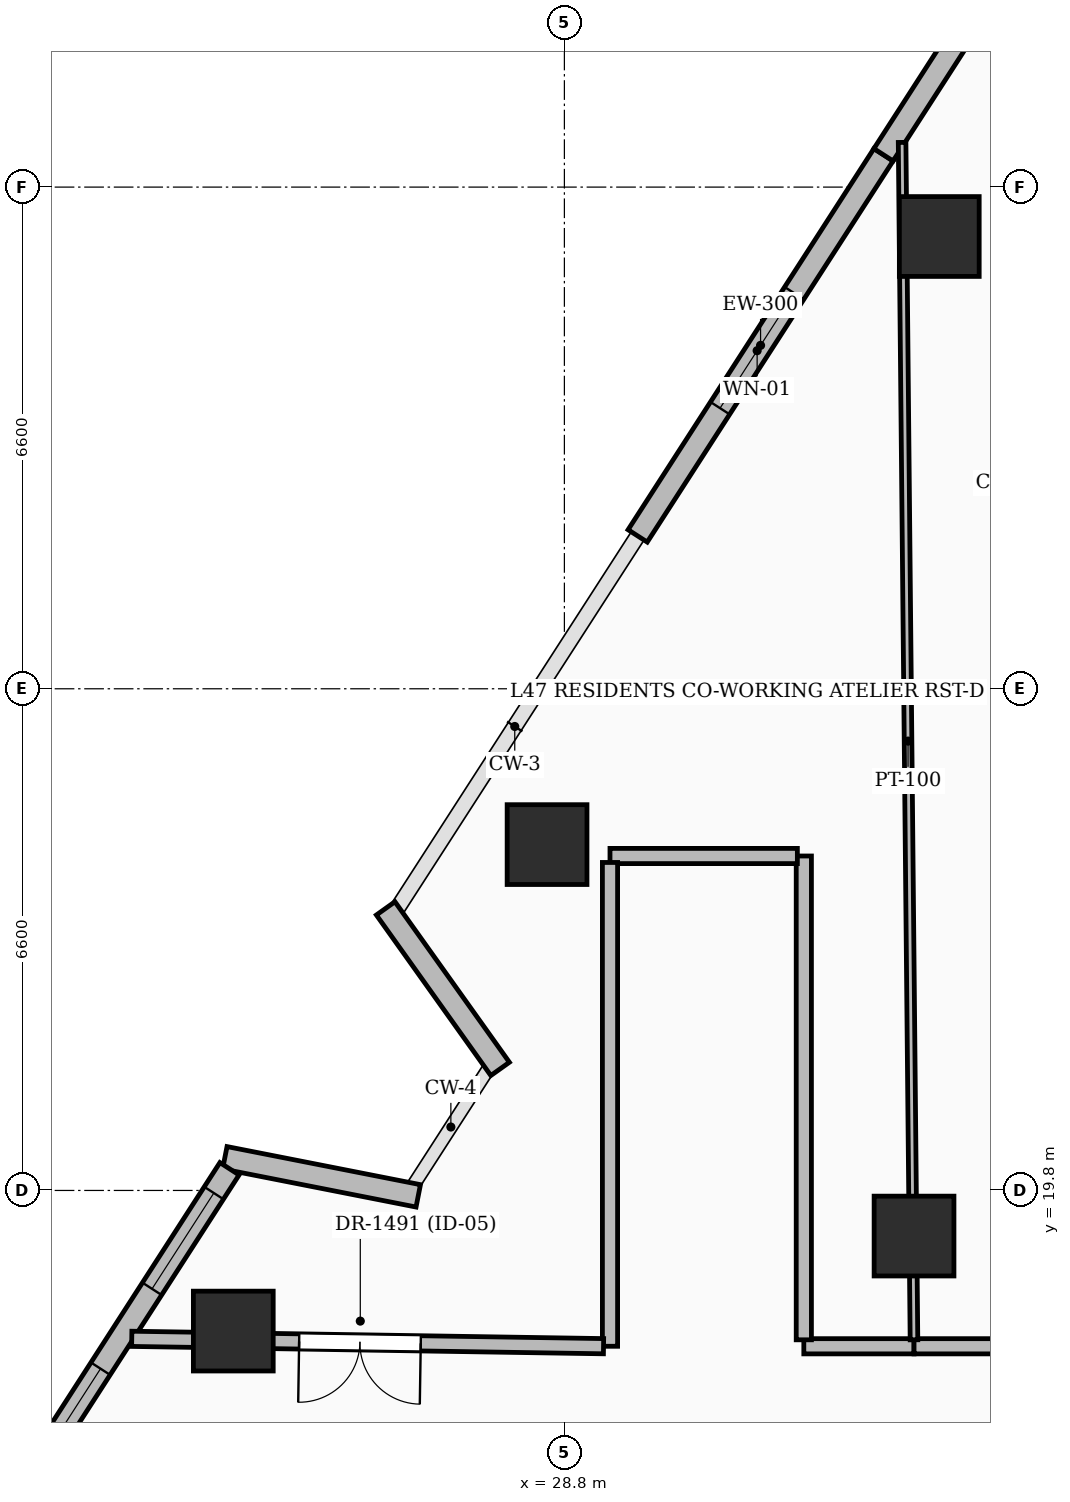
"""IFC4 building model, lengths in metres.
Left out: names, types, materials, properties, quantities, classifications, styles, units other than length and angle.
Written with IfcOpenShell. Run it as: python <this file> out.ifc"""

import sys

from ifc_helpers import new_model, si_unit, direction, frame, frame_2d, origin, origin_2d, place, context, subcontext, project, spatial, rectangle, extrude, element, fill, save


model = new_model("IFC4")
c1 = context("Model", 3, precision=1e-05, world=origin(), true_north=direction((0.0, 1.0)))
c2 = subcontext(c1, "Body", "Model", "MODEL_VIEW")
j1 = project(units=[si_unit("LENGTHUNIT", "METRE"), si_unit("PLANEANGLEUNIT", "RADIAN")], contexts=[c1])
p1 = place(None, origin())
s1 = spatial("IfcSite", under=j1, at=p1, CompositionType="ELEMENT")
p2 = place(p1, origin())
s2 = spatial("IfcBuilding", under=s1, at=p2, CompositionType="ELEMENT")
p3 = place(p2, frame((0.0, 0.0, 182.4)))
s3 = spatial("IfcBuildingStorey", under=s2, at=p3, CompositionType="ELEMENT", Elevation=182.4)
for number, where, z_axis, x_axis in (
    (1, (33.4, 19.2, 0.0), (0.0, 0.0, 1.0), (1.0, 0.0, 0.0)),
    (2, (33.732, 32.35, 0.0), (0.0, 0.0, 1.0), (1.0, 0.0, 0.0)),
    (3, (28.572, 24.35, 0.0), (0.0, 0.0, 1.0), (1.0, 0.0, 0.0)),
    (4, (24.444, 17.95, 0.0), (0.0, 0.0, 1.0), (1.0, 0.0, 0.0)),
):
    element("IfcColumn", number, at=place(p3, frame(where, z_axis=z_axis, x_axis=x_axis)), inside=s3, PredefinedType="COLUMN", context=c2, shape_type="SweptSolid", body=[
        extrude(rectangle(XDim=1.05, YDim=1.05, at=origin_2d()), origin(), (0.0, 0.0, 1.0), 3.6),
    ])
for number, where, z_axis, x_axis in (
    (5, (24.333, 20.23, 0.0), (0.0, 0.0, 1.0), (0.981, -0.193, 0.0)),
    (6, (27.954, 21.399, 0.0), (0.0, 0.0, 1.0), (-0.58, 0.814, 0.0)),
):
    element("IfcWall", number, at=place(p3, frame(where, z_axis=z_axis, x_axis=x_axis)), inside=s3, PredefinedType="SOLIDWALL", context=c2, shape_type="SweptSolid", body=[
        extrude(rectangle(XDim=2.594, YDim=0.3, at=frame_2d((1.297, 0.0))), origin(), (0.0, 0.0, 1.0), 2.575),
    ])
p4 = place(p3, frame((29.764, 28.411, 0.0), z_axis=(0.0, 0.0, 1.0), x_axis=(0.542030871579, 0.840358574809, 0.0)))
e7 = element("IfcWall", 7, at=p4, inside=s3, PredefinedType="SOLIDWALL", context=c2, shape_type="SweptSolid", body=[
    extrude(rectangle(XDim=5.967, YDim=0.3, at=frame_2d((2.983, 0.0))), origin(), (0.0, 0.0, 1.0), 3.35),
])
p5 = place(p4, frame((2.0, 0.0, 0.6)))
e8 = element("IfcOpeningElement", 8, at=p5, cuts=e7, PredefinedType="OPENING", context=c2, shape_type="SweptSolid", body=[
    extrude(rectangle(XDim=1.8, YDim=2.1, at=frame_2d((0.9, 1.05))), frame((0.0, 0.16, 0.0), z_axis=(0.0, -1.0, 0.0), x_axis=(1.0, 0.0, 0.0)), (0.0, 0.0, 1.0), 0.32),
])
p6 = place(p3, frame((32.998, 33.425, 0.0), z_axis=(0.0, 0.0, 1.0), x_axis=(0.542020612911, 0.840365191556, 0.0)))
e9 = element("IfcWall", 9, at=p6, inside=s3, PredefinedType="SOLIDWALL", context=c2, shape_type="SweptSolid", body=[
    extrude(rectangle(XDim=5.966, YDim=0.3, at=frame_2d((2.983, 0.0))), origin(), (0.0, 0.0, 1.0), 3.35),
])
p7 = place(p6, frame((1.725, 0.0, 0.55)))
e10 = element("IfcOpeningElement", 10, at=p7, cuts=e9, PredefinedType="OPENING", context=c2, shape_type="SweptSolid", body=[
    extrude(rectangle(XDim=1.6, YDim=2.2, at=frame_2d((0.8, 1.1))), frame((0.0, 0.16, 0.0), z_axis=(0.0, -1.0, 0.0), x_axis=(1.0, 0.0, 0.0)), (0.0, 0.0, 1.0), 0.32),
])
p8 = place(p3, frame((21.261, 15.228, 0.0), z_axis=(0.0, 0.0, 1.0), x_axis=(0.542022957278, 0.840363679477, 0.0)))
e11 = element("IfcWall", 11, at=p8, inside=s3, PredefinedType="SOLIDWALL", context=c2, shape_type="SweptSolid", body=[
    extrude(rectangle(XDim=5.78, YDim=0.3, at=frame_2d((2.89, 0.0))), origin(), (0.0, 0.0, 1.0), 3.35),
])
p9 = place(p8, frame((1.15, 0.0, 0.6)))
e12 = element("IfcOpeningElement", 12, at=p9, cuts=e11, PredefinedType="OPENING", context=c2, shape_type="SweptSolid", body=[
    extrude(rectangle(XDim=1.5, YDim=2.1, at=frame_2d((0.75, 1.05))), frame((0.0, 0.16, 0.0), z_axis=(0.0, -1.0, 0.0), x_axis=(1.0, 0.0, 0.0)), (0.0, 0.0, 1.0), 0.32),
])
p10 = place(p8, frame((3.9, 0.0, 0.6)))
e13 = element("IfcOpeningElement", 13, at=p10, cuts=e11, PredefinedType="OPENING", context=c2, shape_type="SweptSolid", body=[
    extrude(rectangle(XDim=1.5, YDim=2.1, at=frame_2d((0.75, 1.05))), frame((0.0, 0.16, 0.0), z_axis=(0.0, -1.0, 0.0), x_axis=(1.0, 0.0, 0.0)), (0.0, 0.0, 1.0), 0.32),
])
p11 = place(p3, frame((33.4, 17.75, 0.0), z_axis=(0.0, 0.0, 1.0), x_axis=(-1.0, 0.0, 0.0)))
e14 = element("IfcWall", 14, at=p11, inside=s3, PredefinedType="PARTITIONING", context=c2, shape_type="SweptSolid", body=[
    extrude(rectangle(XDim=1.45, YDim=0.2, at=frame_2d((0.725, 0.0))), origin(), (0.0, 0.0, 1.0), 3.35),
])
p12 = place(p3, frame((31.95, 17.835, 0.0), z_axis=(0.0, 0.0, 1.0), x_axis=(0.0, 1.0, 0.0)))
e15 = element("IfcWall", 15, at=p12, inside=s3, PredefinedType="PARTITIONING", context=c2, shape_type="SweptSolid", body=[
    extrude(rectangle(XDim=6.365, YDim=0.2, at=frame_2d((3.183, 0.0))), origin(), (0.0, 0.0, 1.0), 2.464),
])
p13 = place(p3, frame((31.865, 24.2, 0.0), z_axis=(0.0, 0.0, 1.0), x_axis=(-1.0, 0.0, 0.0)))
e16 = element("IfcWall", 16, at=p13, inside=s3, PredefinedType="PARTITIONING", context=c2, shape_type="SweptSolid", body=[
    extrude(rectangle(XDim=2.465, YDim=0.2, at=frame_2d((1.232, 0.0))), origin(), (0.0, 0.0, 1.0), 3.01),
])
p14 = place(p3, frame((29.4, 24.115, 0.0), z_axis=(0.0, 0.0, 1.0), x_axis=(0.0, -1.0, 0.0)))
e17 = element("IfcWall", 17, at=p14, inside=s3, PredefinedType="PARTITIONING", context=c2, shape_type="SweptSolid", body=[
    extrude(rectangle(XDim=6.365, YDim=0.2, at=frame_2d((3.183, 0.0))), origin(), (0.0, 0.0, 1.0), 2.464),
])
p15 = place(p3, frame((29.315, 17.751, 0.0), z_axis=(0.0, 0.0, 1.0), x_axis=(-0.999878105574, 0.01561326337, 0.0)))
e18 = element("IfcWall", 18, at=p15, inside=s3, PredefinedType="PARTITIONING", context=c2, shape_type="SweptSolid", body=[
    extrude(rectangle(XDim=6.208, YDim=0.2, at=frame_2d((3.104, 0.0))), origin(), (0.0, 0.0, 1.0), 3.01),
])
p16 = place(p15, frame((2.405, 0.0, 0.0)))
e19 = element("IfcOpeningElement", 19, at=p16, cuts=e18, PredefinedType="OPENING", context=c2, shape_type="SweptSolid", body=[
    extrude(rectangle(XDim=1.6, YDim=2.3, at=frame_2d((0.8, 1.15))), frame((0.0, 0.11, 0.0), z_axis=(0.0, -1.0, 0.0), x_axis=(1.0, 0.0, 0.0)), (0.0, 0.0, 1.0), 0.22),
])
p17 = place(p3, frame((38.13, 17.75, 0.0), z_axis=(0.0, 0.0, 1.0), x_axis=(-1.0, 0.0, 0.0)))
e20 = element("IfcWall", 20, at=p17, inside=s3, PredefinedType="PARTITIONING", context=c2, shape_type="SweptSolid", body=[
    extrude(rectangle(XDim=4.73, YDim=0.2, at=frame_2d((2.365, 0.0))), origin(), (0.0, 0.0, 1.0), 2.436),
])
p18 = place(p17, frame((1.565, 0.0, 0.0)))
e21 = element("IfcOpeningElement", 21, at=p18, cuts=e20, PredefinedType="OPENING", context=c2, shape_type="SweptSolid", body=[
    extrude(rectangle(XDim=1.6, YDim=2.3, at=frame_2d((0.8, 1.15))), frame((0.0, 0.11, 0.0), z_axis=(0.0, -1.0, 0.0), x_axis=(1.0, 0.0, 0.0)), (0.0, 0.0, 1.0), 0.22),
])
p19 = place(p3, frame((33.399, 17.835, 0.0), z_axis=(0.0, 0.0, 1.0), x_axis=(-0.009933797845, 0.999950658613, 0.0)))
e22 = element("IfcWall", 22, at=p19, inside=s3, PredefinedType="PARTITIONING", context=c2, shape_type="SweptSolid", body=[
    extrude(rectangle(XDim=15.754, YDim=0.1, at=frame_2d((7.877, 0.0))), origin(), (0.0, 0.0, 1.0), 2.436),
])
p20 = place(p5, origin())
e23 = element("IfcWindow", 23, at=p20, inside=s3, PartitioningType="SINGLE_PANEL", PredefinedType="WINDOW", context=c2, shape_type="SweptSolid", body=[
    extrude(rectangle(XDim=1.8, YDim=2.1, at=frame_2d((0.9, 1.05))), frame((0.0, 0.03, 0.0), z_axis=(0.0, -1.0, 0.0), x_axis=(1.0, 0.0, 0.0)), (0.0, 0.0, 1.0), 0.06),
])
fill(e8, e23)
p21 = place(p9, origin())
e24 = element("IfcWindow", 24, at=p21, inside=s3, PartitioningType="SINGLE_PANEL", PredefinedType="WINDOW", context=c2, shape_type="SweptSolid", body=[
    extrude(rectangle(XDim=1.5, YDim=2.1, at=frame_2d((0.75, 1.05))), frame((0.0, 0.03, 0.0), z_axis=(0.0, -1.0, 0.0), x_axis=(1.0, 0.0, 0.0)), (0.0, 0.0, 1.0), 0.06),
])
fill(e12, e24)
p22 = place(p10, origin())
e25 = element("IfcWindow", 25, at=p22, inside=s3, PartitioningType="SINGLE_PANEL", PredefinedType="WINDOW", context=c2, shape_type="SweptSolid", body=[
    extrude(rectangle(XDim=1.5, YDim=2.1, at=frame_2d((0.75, 1.05))), frame((0.0, 0.03, 0.0), z_axis=(0.0, -1.0, 0.0), x_axis=(1.0, 0.0, 0.0)), (0.0, 0.0, 1.0), 0.06),
])
fill(e13, e25)
p23 = place(p16, origin())
e26 = element("IfcDoor", 26, at=p23, inside=s3, OperationType="DOUBLE_DOOR_SINGLE_SWING", PredefinedType="DOOR", context=c2, shape_type="SweptSolid", body=[
    extrude(rectangle(XDim=1.6, YDim=2.3, at=frame_2d((0.8, 1.15))), frame((0.0, 0.025, 0.0), z_axis=(0.0, -1.0, 0.0), x_axis=(1.0, 0.0, 0.0)), (0.0, 0.0, 1.0), 0.05),
])
fill(e19, e26)
save(model, sys.argv[1])
